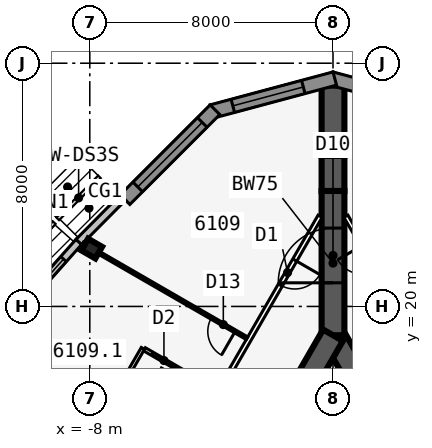
"""IFC4 building model, lengths in metres.
Left out: names, types, materials, properties, quantities, classifications, styles, units other than length and angle.
Written with IfcOpenShell. Run it as: python <this file> out.ifc"""

import sys

from ifc_helpers import new_model, si_unit, direction, frame, frame_2d, origin, origin_2d, place, context, subcontext, project, spatial, polyline, rectangle, i_section, outline, extrude, element, fill, save


model = new_model("IFC4")
c1 = context("Model", 3, precision=1e-05, world=origin(), true_north=direction((0.0, 1.0)))
c2 = subcontext(c1, "Body", "Model", "MODEL_VIEW")
j1 = project(units=[si_unit("LENGTHUNIT", "METRE"), si_unit("PLANEANGLEUNIT", "RADIAN")], contexts=[c1])
p1 = place(None, origin())
s1 = spatial("IfcSite", under=j1, at=p1, CompositionType="ELEMENT")
p2 = place(p1, origin())
s2 = spatial("IfcBuilding", under=s1, at=p2, CompositionType="ELEMENT")
p3 = place(p2, frame((0.0, 0.0, 229.7)))
s3 = spatial("IfcBuildingStorey", under=s2, at=p3, CompositionType="ELEMENT", Elevation=229.7)
p4 = place(p3, frame((16.5, -9.526, 0.0), z_axis=(0.0, 0.0, 1.0), x_axis=(-0.499999749417, 0.866025548458, 0.0)))
e1 = element("IfcWall", 1, at=p4, inside=s3, PredefinedType="SHEAR", context=c2, shape_type="SweptSolid", body=[
    extrude(rectangle(XDim=33.0, YDim=0.75, at=frame_2d((16.5, 0.0))), origin(), (0.0, 0.0, 1.0), 3.6),
])
p5 = place(p4, frame((14.15, 0.0, 0.0)))
e2 = element("IfcOpeningElement", 2, at=p5, cuts=e1, PredefinedType="OPENING", context=c2, shape_type="SweptSolid", body=[
    extrude(rectangle(XDim=1.8, YDim=2.13, at=frame_2d((0.9, 1.065))), frame((0.0, 0.385, 0.0), z_axis=(0.0, -1.0, 0.0), x_axis=(1.0, 0.0, 0.0)), (0.0, 0.0, 1.0), 0.77),
])
p6 = place(p4, frame((12.6, 0.0, 0.0)))
e3 = element("IfcOpeningElement", 3, at=p6, cuts=e1, PredefinedType="OPENING", context=c2, shape_type="SweptSolid", body=[
    extrude(rectangle(XDim=1.0, YDim=2.13, at=frame_2d((0.5, 1.065))), frame((0.0, 0.385, 0.0), z_axis=(0.0, -1.0, 0.0), x_axis=(1.0, 0.0, 0.0)), (0.0, 0.0, 1.0), 0.77),
])
p7 = place(p3, frame((0.0, 19.052, 0.0), z_axis=(0.0, 0.0, 1.0), x_axis=(-0.499999749417, -0.866025548458, 0.0)))
e4 = element("IfcWall", 4, at=p7, inside=s3, PredefinedType="SHEAR", context=c2, shape_type="SweptSolid", body=[
    extrude(rectangle(XDim=33.0, YDim=0.75, at=frame_2d((16.5, 0.0))), origin(), (0.0, 0.0, 1.0), 3.6),
])
p8 = place(p7, frame((14.15, 0.0, 0.0)))
e5 = element("IfcOpeningElement", 5, at=p8, cuts=e4, PredefinedType="OPENING", context=c2, shape_type="SweptSolid", body=[
    extrude(rectangle(XDim=1.8, YDim=2.13, at=frame_2d((0.9, 1.065))), frame((0.0, 0.385, 0.0), z_axis=(0.0, -1.0, 0.0), x_axis=(1.0, 0.0, 0.0)), (0.0, 0.0, 1.0), 0.77),
])
p9 = place(p7, frame((12.6, 0.0, 0.0)))
e6 = element("IfcOpeningElement", 6, at=p9, cuts=e4, PredefinedType="OPENING", context=c2, shape_type="SweptSolid", body=[
    extrude(rectangle(XDim=1.0, YDim=2.13, at=frame_2d((0.5, 1.065))), frame((0.0, 0.385, 0.0), z_axis=(0.0, -1.0, 0.0), x_axis=(1.0, 0.0, 0.0)), (0.0, 0.0, 1.0), 0.77),
])
p10 = place(p3, frame((0.0, 19.052, 0.0), z_axis=(0.0, 0.0, 1.0), x_axis=(0.0, 1.0, 0.0)))
e7 = element("IfcWall", 7, at=p10, inside=s3, PredefinedType="SHEAR", context=c2, shape_type="SweptSolid", body=[
    extrude(rectangle(XDim=4.746, YDim=0.75, at=frame_2d((2.373, 0.0))), origin(), (0.0, 0.0, 1.0), 3.6),
])
p11 = place(p10, frame((1.725, 0.0, 0.0)))
e8 = element("IfcOpeningElement", 8, at=p11, cuts=e7, PredefinedType="OPENING", context=c2, shape_type="SweptSolid", body=[
    extrude(rectangle(XDim=1.8, YDim=2.13, at=frame_2d((0.9, 1.065))), frame((0.0, 0.385, 0.0), z_axis=(0.0, -1.0, 0.0), x_axis=(1.0, 0.0, 0.0)), (0.0, 0.0, 1.0), 0.77),
])
p12 = place(p3, frame((0.0, 23.799, 0.0), z_axis=(0.0, 0.0, 1.0), x_axis=(0.0, 1.0, 0.0)))
e9 = element("IfcWall", 9, at=p12, inside=s3, PredefinedType="SHEAR", context=c2, shape_type="SweptSolid", body=[
    extrude(rectangle(XDim=1.155, YDim=0.75, at=frame_2d((0.577, 0.0))), origin(), (0.0, 0.0, 1.0), 3.6),
])
p13 = place(p3, frame((0.0, 24.953, 0.0), z_axis=(0.0, 0.0, 1.0), x_axis=(0.0, 1.0, 0.0)))
e10 = element("IfcWall", 10, at=p13, inside=s3, PredefinedType="SHEAR", context=c2, shape_type="SweptSolid", body=[
    extrude(rectangle(XDim=2.309, YDim=0.75, at=frame_2d((1.155, 0.0))), origin(), (0.0, 0.0, 1.0), 3.6),
])
p14 = place(p3, frame((-7.937, 21.903, 0.0), z_axis=(0.0, 0.0, 1.0), x_axis=(-0.5, -0.866025403784, 0.0)))
e11 = element("IfcColumn", 11, at=p14, inside=s3, PredefinedType="COLUMN", context=c2, shape_type="SweptSolid", body=[
    extrude(i_section(OverallWidth=0.442, OverallDepth=0.531, WebThickness=0.066, FlangeThickness=0.106, at=origin_2d()), origin(), (0.0, 0.0, 1.0), 3.6),
])
p15 = place(p3, frame((3.983, 26.413, 0.0), z_axis=(0.0, 0.0, 1.0), x_axis=(-0.965920442324, 0.258839137498, 0.0)))
e12 = element("IfcWall", 12, at=p15, inside=s3, PredefinedType="SOLIDWALL", context=c2, shape_type="SweptSolid", body=[
    extrude(outline(polyline([(4.184, 0.225), (4.124, 0.225), (3.706, 0.113), (3.676, 0.225), (0.0, 0.225), (0.0, -0.225), (4.184, -0.225), (4.184, 0.225)])), origin(), (0.0, 0.0, 1.0), 3.35),
])
p16 = place(p15, frame((0.713, 0.0, 0.45)))
e13 = element("IfcOpeningElement", 13, at=p16, cuts=e12, PredefinedType="OPENING", context=c2, shape_type="SweptSolid", body=[
    extrude(rectangle(XDim=2.4, YDim=2.6, at=frame_2d((1.2, 1.3))), frame((0.0, 0.235, 0.0), z_axis=(0.0, -1.0, 0.0), x_axis=(1.0, 0.0, 0.0)), (0.0, 0.0, 1.0), 0.47),
])
p17 = place(p3, frame((0.058, 27.496, 0.0), z_axis=(0.0, 0.0, 1.0), x_axis=(-0.965920442324, -0.258839137498, 0.0)))
e14 = element("IfcWall", 14, at=p17, inside=s3, PredefinedType="SOLIDWALL", context=c2, shape_type="SweptSolid", body=[
    extrude(outline(polyline([(4.184, 0.225), (0.509, 0.225), (0.479, 0.113), (0.06, 0.225), (0.0, 0.225), (0.0, -0.225), (4.184, -0.225), (4.184, 0.225)])), origin(), (0.0, 0.0, 1.0), 3.35),
])
p18 = place(p17, frame((1.071, 0.0, 0.45)))
e15 = element("IfcOpeningElement", 15, at=p18, cuts=e14, PredefinedType="OPENING", context=c2, shape_type="SweptSolid", body=[
    extrude(rectangle(XDim=2.4, YDim=2.6, at=frame_2d((1.2, 1.3))), frame((0.0, 0.235, 0.0), z_axis=(0.0, -1.0, 0.0), x_axis=(1.0, 0.0, 0.0)), (0.0, 0.0, 1.0), 0.47),
])
p19 = place(p3, frame((-3.882, 26.471, 0.0), z_axis=(0.0, 0.0, 1.0), x_axis=(-0.707106781187, -0.707106781187, 0.0)))
e16 = element("IfcWall", 16, at=p19, inside=s3, PredefinedType="SOLIDWALL", context=c2, shape_type="SweptSolid", body=[
    extrude(rectangle(XDim=4.184, YDim=0.45, at=frame_2d((2.092, 0.0))), origin(), (0.0, 0.0, 1.0), 3.35),
])
p20 = place(p19, frame((0.592, 0.0, 0.45)))
e17 = element("IfcOpeningElement", 17, at=p20, cuts=e16, PredefinedType="OPENING", context=c2, shape_type="SweptSolid", body=[
    extrude(rectangle(XDim=3.0, YDim=2.6, at=frame_2d((1.5, 1.3))), frame((0.0, 0.235, 0.0), z_axis=(0.0, -1.0, 0.0), x_axis=(1.0, 0.0, 0.0)), (0.0, 0.0, 1.0), 0.47),
])
p21 = place(p3, frame((-6.911, 23.583, 0.0), z_axis=(0.0, 0.0, 1.0), x_axis=(-0.704149946111, -0.710051303352, 0.0)))
e18 = element("IfcWall", 18, at=p21, inside=s3, PredefinedType="STANDARD", context=c2, shape_type="SweptSolid", body=[
    extrude(rectangle(XDim=2.069, YDim=0.25, at=frame_2d((1.034, 0.0))), origin(), (0.0, 0.0, 1.0), 3.35),
])
p22 = place(p3, frame((-8.363, 22.12, 0.0), z_axis=(0.0, 0.0, 1.0), x_axis=(-0.664348996191, -0.747422511876, 0.0)))
e19 = element("IfcWall", 19, at=p22, inside=s3, PredefinedType="STANDARD", context=c2, shape_type="SweptSolid", body=[
    extrude(rectangle(XDim=5.105, YDim=0.25, at=frame_2d((2.552, 0.0))), origin(), (0.0, 0.0, 1.0), 3.35),
])
p23 = place(p22, frame((0.752, 0.0, 0.45)))
e20 = element("IfcOpeningElement", 20, at=p23, cuts=e19, PredefinedType="OPENING", context=c2, shape_type="SweptSolid", body=[
    extrude(rectangle(XDim=3.6, YDim=2.6, at=frame_2d((1.8, 1.3))), frame((0.0, 0.135, 0.0), z_axis=(0.0, -1.0, 0.0), x_axis=(1.0, 0.0, 0.0)), (0.0, 0.0, 1.0), 0.27),
])
p24 = place(p3, frame((20.102, -11.115, 0.0), z_axis=(0.0, 0.0, 1.0), x_axis=(-0.500000265775, 0.866025250339, 0.0)))
e21 = element("IfcWall", 21, at=p24, inside=s3, PredefinedType="PARTITIONING", context=c2, shape_type="SweptSolid", body=[
    extrude(rectangle(XDim=39.354, YDim=0.15, at=frame_2d((19.677, 0.0))), origin(), (0.0, 0.0, 1.0), 3.35),
])
p25 = place(p24, frame((1.102, 0.0, 0.0)))
e22 = element("IfcOpeningElement", 22, at=p25, cuts=e21, PredefinedType="OPENING", context=c2, shape_type="SweptSolid", body=[
    extrude(rectangle(XDim=0.95, YDim=2.13, at=frame_2d((0.475, 1.065))), frame((0.0, 0.085, 0.0), z_axis=(0.0, -1.0, 0.0), x_axis=(1.0, 0.0, 0.0)), (0.0, 0.0, 1.0), 0.17),
])
p26 = place(p24, frame((11.702, 0.0, 0.0)))
e23 = element("IfcOpeningElement", 23, at=p26, cuts=e21, PredefinedType="OPENING", context=c2, shape_type="SweptSolid", body=[
    extrude(rectangle(XDim=0.95, YDim=2.13, at=frame_2d((0.475, 1.065))), frame((0.0, 0.085, 0.0), z_axis=(0.0, -1.0, 0.0), x_axis=(1.0, 0.0, 0.0)), (0.0, 0.0, 1.0), 0.17),
])
p27 = place(p24, frame((26.702, 0.0, 0.0)))
e24 = element("IfcOpeningElement", 24, at=p27, cuts=e21, PredefinedType="OPENING", context=c2, shape_type="SweptSolid", body=[
    extrude(rectangle(XDim=0.95, YDim=2.13, at=frame_2d((0.475, 1.065))), frame((0.0, 0.085, 0.0), z_axis=(0.0, -1.0, 0.0), x_axis=(1.0, 0.0, 0.0)), (0.0, 0.0, 1.0), 0.17),
])
p28 = place(p24, frame((37.302, 0.0, 0.0)))
e25 = element("IfcOpeningElement", 25, at=p28, cuts=e21, PredefinedType="OPENING", context=c2, shape_type="SweptSolid", body=[
    extrude(rectangle(XDim=0.95, YDim=2.13, at=frame_2d((0.475, 1.065))), frame((0.0, 0.085, 0.0), z_axis=(0.0, -1.0, 0.0), x_axis=(1.0, 0.0, 0.0)), (0.0, 0.0, 1.0), 0.17),
])
p29 = place(p3, frame((-0.425, 22.966, 0.0), z_axis=(0.0, 0.0, 1.0), x_axis=(-0.500000265775, -0.866025250339, 0.0)))
e26 = element("IfcWall", 26, at=p29, inside=s3, PredefinedType="PARTITIONING", context=c2, shape_type="SweptSolid", body=[
    extrude(rectangle(XDim=39.354, YDim=0.15, at=frame_2d((19.677, 0.0))), origin(), (0.0, 0.0, 1.0), 3.35),
])
p30 = place(p29, frame((1.665, 0.0, 0.0)))
e27 = element("IfcOpeningElement", 27, at=p30, cuts=e26, PredefinedType="OPENING", context=c2, shape_type="SweptSolid", body=[
    extrude(rectangle(XDim=0.95, YDim=2.13, at=frame_2d((0.475, 1.065))), frame((0.0, 0.085, 0.0), z_axis=(0.0, -1.0, 0.0), x_axis=(1.0, 0.0, 0.0)), (0.0, 0.0, 1.0), 0.17),
])
p31 = place(p29, frame((11.702, 0.0, 0.0)))
e28 = element("IfcOpeningElement", 28, at=p31, cuts=e26, PredefinedType="OPENING", context=c2, shape_type="SweptSolid", body=[
    extrude(rectangle(XDim=0.95, YDim=2.13, at=frame_2d((0.475, 1.065))), frame((0.0, 0.085, 0.0), z_axis=(0.0, -1.0, 0.0), x_axis=(1.0, 0.0, 0.0)), (0.0, 0.0, 1.0), 0.17),
])
p32 = place(p29, frame((21.702, 0.0, 0.0)))
e29 = element("IfcOpeningElement", 29, at=p32, cuts=e26, PredefinedType="OPENING", context=c2, shape_type="SweptSolid", body=[
    extrude(rectangle(XDim=0.95, YDim=2.13, at=frame_2d((0.475, 1.065))), frame((0.0, 0.085, 0.0), z_axis=(0.0, -1.0, 0.0), x_axis=(1.0, 0.0, 0.0)), (0.0, 0.0, 1.0), 0.17),
])
p33 = place(p29, frame((36.739, 0.0, 0.0)))
e30 = element("IfcOpeningElement", 30, at=p33, cuts=e26, PredefinedType="OPENING", context=c2, shape_type="SweptSolid", body=[
    extrude(rectangle(XDim=0.95, YDim=2.13, at=frame_2d((0.475, 1.065))), frame((0.0, 0.085, 0.0), z_axis=(0.0, -1.0, 0.0), x_axis=(1.0, 0.0, 0.0)), (0.0, 0.0, 1.0), 0.17),
])
p34 = place(p3, frame((-2.829, 18.954, 0.0), z_axis=(0.0, 0.0, 1.0), x_axis=(-0.866026604282, 0.499997920671, 0.0)))
e31 = element("IfcWall", 31, at=p34, inside=s3, PredefinedType="PARTITIONING", context=c2, shape_type="SweptSolid", body=[
    extrude(rectangle(XDim=6.24, YDim=0.1, at=frame_2d((3.12, 0.0))), origin(), (0.0, 0.0, 1.0), 2.25),
])
p35 = place(p34, frame((0.45, 0.0, 0.0)))
e32 = element("IfcOpeningElement", 32, at=p35, cuts=e31, PredefinedType="OPENING", context=c2, shape_type="SweptSolid", body=[
    extrude(rectangle(XDim=0.9, YDim=2.13, at=frame_2d((0.45, 1.065))), frame((0.0, 0.06, 0.0), z_axis=(0.0, -1.0, 0.0), x_axis=(1.0, 0.0, 0.0)), (0.0, 0.0, 1.0), 0.12),
])
p36 = place(p3, frame((-5.329, 14.623, 0.0), z_axis=(0.0, 0.0, 1.0), x_axis=(-0.866017877653, 0.500013035415, 0.0)))
e33 = element("IfcWall", 33, at=p36, inside=s3, PredefinedType="PARTITIONING", context=c2, shape_type="SweptSolid", body=[
    extrude(rectangle(XDim=7.273, YDim=0.15, at=frame_2d((3.636, 0.0))), origin(), (0.0, 0.0, 1.0), 2.309),
])
p37 = place(p3, frame((-6.253, 18.622, 0.0), z_axis=(0.0, 0.0, 1.0), x_axis=(-0.499990139034, -0.866031096941, 0.0)))
e34 = element("IfcWall", 34, at=p37, inside=s3, PredefinedType="PLUMBINGWALL", context=c2, shape_type="SweptSolid", body=[
    extrude(rectangle(XDim=3.0, YDim=0.12, at=frame_2d((1.5, 0.0))), origin(), (0.0, 0.0, 1.0), 3.35),
])
p38 = place(p3, frame((-3.829, 17.221, 0.0), z_axis=(0.0, 0.0, 1.0), x_axis=(-0.865997131366, 0.500048966069, 0.0)))
e35 = element("IfcWall", 35, at=p38, inside=s3, PredefinedType="PLUMBINGWALL", context=c2, shape_type="SweptSolid", body=[
    extrude(rectangle(XDim=2.74, YDim=0.12, at=frame_2d((1.37, 0.0))), origin(), (0.0, 0.0, 1.0), 3.35),
])
p39 = place(p38, frame((1.55, 0.0, 0.0)))
e36 = element("IfcOpeningElement", 36, at=p39, cuts=e35, PredefinedType="OPENING", context=c2, shape_type="SweptSolid", body=[
    extrude(rectangle(XDim=0.9, YDim=2.13, at=frame_2d((0.45, 1.065))), frame((0.0, 0.07, 0.0), z_axis=(0.0, -1.0, 0.0), x_axis=(1.0, 0.0, 0.0)), (0.0, 0.0, 1.0), 0.14),
])
p40 = place(p18, origin())
e37 = element("IfcWindow", 37, at=p40, inside=s3, PartitioningType="SINGLE_PANEL", PredefinedType="WINDOW", context=c2, shape_type="SweptSolid", body=[
    extrude(rectangle(XDim=2.4, YDim=2.6, at=frame_2d((1.2, 1.3))), frame((0.0, 0.03, 0.0), z_axis=(0.0, -1.0, 0.0), x_axis=(1.0, 0.0, 0.0)), (0.0, 0.0, 1.0), 0.06),
])
fill(e15, e37)
p41 = place(p20, origin())
e38 = element("IfcWindow", 38, at=p41, inside=s3, PartitioningType="SINGLE_PANEL", PredefinedType="WINDOW", context=c2, shape_type="SweptSolid", body=[
    extrude(rectangle(XDim=3.0, YDim=2.6, at=frame_2d((1.5, 1.3))), frame((0.0, 0.03, 0.0), z_axis=(0.0, -1.0, 0.0), x_axis=(1.0, 0.0, 0.0)), (0.0, 0.0, 1.0), 0.06),
])
fill(e17, e38)
p42 = place(p23, origin())
e39 = element("IfcWindow", 39, at=p42, inside=s3, PartitioningType="SINGLE_PANEL", PredefinedType="WINDOW", context=c2, shape_type="SweptSolid", body=[
    extrude(rectangle(XDim=3.6, YDim=2.6, at=frame_2d((1.8, 1.3))), frame((0.0, 0.03, 0.0), z_axis=(0.0, -1.0, 0.0), x_axis=(1.0, 0.0, 0.0)), (0.0, 0.0, 1.0), 0.06),
])
fill(e20, e39)
p43 = place(p35, origin())
e40 = element("IfcDoor", 40, at=p43, inside=s3, OperationType="SINGLE_SWING_LEFT", PredefinedType="DOOR", context=c2, shape_type="SweptSolid", body=[
    extrude(rectangle(XDim=0.9, YDim=2.13, at=frame_2d((0.45, 1.065))), frame((0.0, 0.025, 0.0), z_axis=(0.0, -1.0, 0.0), x_axis=(1.0, 0.0, 0.0)), (0.0, 0.0, 1.0), 0.05),
])
fill(e32, e40)
p44 = place(p30, origin())
e41 = element("IfcDoor", 41, at=p44, inside=s3, OperationType="SINGLE_SWING_LEFT", PredefinedType="DOOR", context=c2, shape_type="SweptSolid", body=[
    extrude(rectangle(XDim=0.95, YDim=2.13, at=frame_2d((0.475, 1.065))), frame((0.0, 0.025, 0.0), z_axis=(0.0, -1.0, 0.0), x_axis=(1.0, 0.0, 0.0)), (0.0, 0.0, 1.0), 0.05),
])
fill(e27, e41)
p45 = place(p39, origin())
e42 = element("IfcDoor", 42, at=p45, inside=s3, OperationType="SLIDING_TO_LEFT", PredefinedType="DOOR", context=c2, shape_type="SweptSolid", body=[
    extrude(rectangle(XDim=0.9, YDim=2.13, at=frame_2d((0.45, 1.065))), frame((0.0, 0.025, 0.0), z_axis=(0.0, -1.0, 0.0), x_axis=(1.0, 0.0, 0.0)), (0.0, 0.0, 1.0), 0.05),
])
fill(e36, e42)
p46 = place(p11, origin())
e43 = element("IfcDoor", 43, at=p46, inside=s3, OperationType="DOUBLE_DOOR_DOUBLE_SWING", PredefinedType="DOOR", context=c2, shape_type="SweptSolid", body=[
    extrude(rectangle(XDim=1.8, YDim=2.13, at=frame_2d((0.9, 1.065))), frame((0.0, 0.025, 0.0), z_axis=(0.0, -1.0, 0.0), x_axis=(1.0, 0.0, 0.0)), (0.0, 0.0, 1.0), 0.05),
])
fill(e8, e43)
save(model, sys.argv[1])
